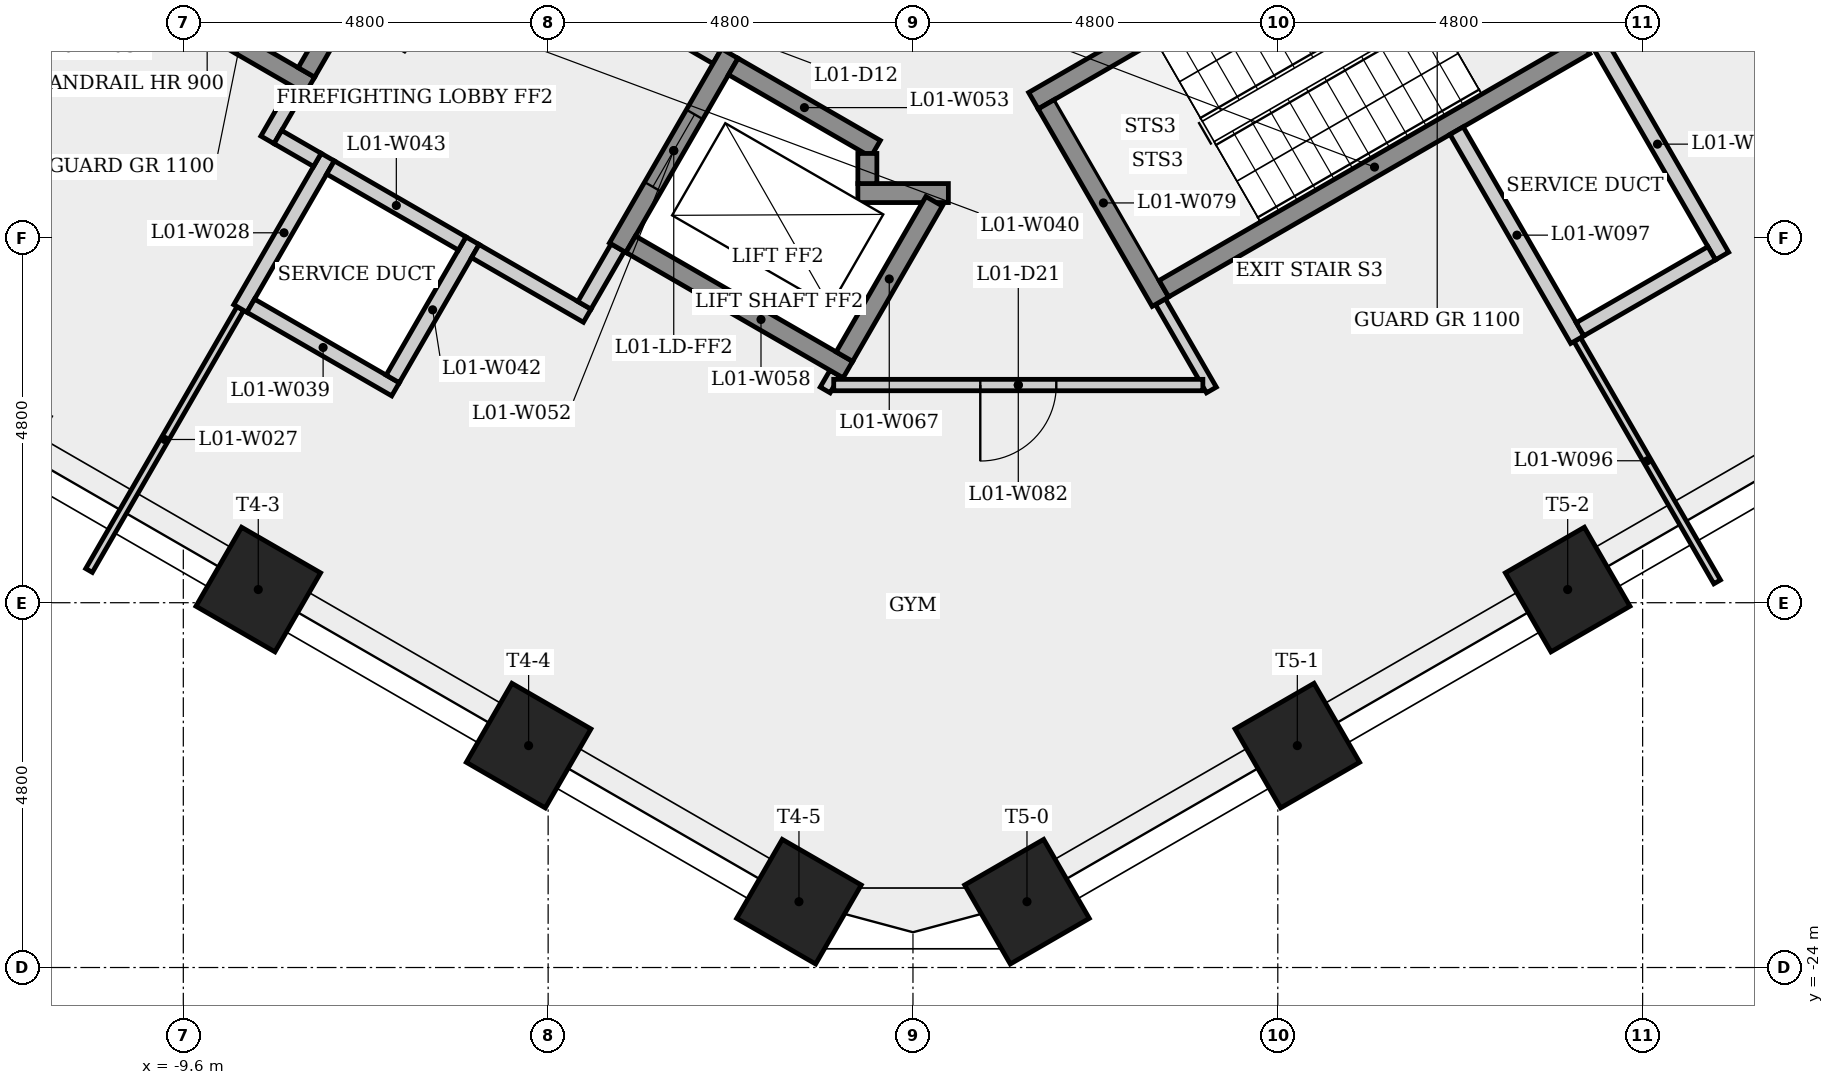
"""IFC4 building model, lengths in metres.
Left out: names, types, materials, properties, quantities, classifications, styles, units other than length and angle.
Written with IfcOpenShell. Run it as: python <this file> out.ifc"""

import sys

from ifc_helpers import new_model, si_unit, direction, frame, frame_2d, origin, origin_2d, place, context, subcontext, project, spatial, rectangle, extrude, element, fill, save


model = new_model("IFC4")
c1 = context("Model", 3, precision=1e-05, world=origin(), true_north=direction((0.0, 1.0)))
c2 = subcontext(c1, "Body", "Model", "MODEL_VIEW")
j1 = project(units=[si_unit("LENGTHUNIT", "METRE"), si_unit("PLANEANGLEUNIT", "RADIAN")], contexts=[c1])
p1 = place(None, origin())
s1 = spatial("IfcSite", under=j1, at=p1, CompositionType="ELEMENT")
p2 = place(p1, origin())
s2 = spatial("IfcBuilding", under=s1, at=p2, CompositionType="ELEMENT")
p3 = place(p2, frame((0.0, 0.0, 7.0)))
s3 = spatial("IfcBuildingStorey", under=s2, at=p3, CompositionType="ELEMENT", Elevation=7.0)
for number, where, z_axis, x_axis in (
    (1, (-8.614, -19.027, 0.0), (0.0, 0.0, 1.0), (-0.5, -0.866, 0.0)),
    (2, (-5.057, -21.08, 0.0), (0.0, 0.0, 1.0), (-0.5, -0.866, 0.0)),
    (3, (-1.5, -23.134, 0.0), (0.0, 0.0, 1.0), (-0.5, -0.866, 0.0)),
    (4, (1.5, -23.134, 0.0), (0.0, 0.0, 1.0), (0.5, -0.866, 0.0)),
    (5, (5.057, -21.08, 0.0), (0.0, 0.0, 1.0), (0.5, -0.866, 0.0)),
    (6, (8.614, -19.027, 0.0), (0.0, 0.0, 1.0), (0.5, -0.866, 0.0)),
):
    element("IfcColumn", number, at=place(p3, frame(where, z_axis=z_axis, x_axis=x_axis)), inside=s3, PredefinedType="COLUMN", context=c2, shape_type="SweptSolid", body=[
        extrude(rectangle(XDim=1.2, YDim=1.2, at=origin_2d()), origin(), (0.0, 0.0, 1.0), 4.5),
    ])
p4 = place(p3, frame((-10.84, -18.776, 0.0), z_axis=(0.0, 0.0, 1.0), x_axis=(0.499991453095, 0.866030338286, 0.0)))
e7 = element("IfcWall", 7, at=p4, inside=s3, PredefinedType="PARTITIONING", context=c2, shape_type="SweptSolid", body=[
    extrude(rectangle(XDim=3.98, YDim=0.1, at=frame_2d((1.99, 0.0))), origin(), (0.0, 0.0, 1.0), 4.1),
])
p5 = place(p3, frame((-8.85, -15.329, 0.0), z_axis=(0.0, 0.0, 1.0), x_axis=(0.500077740698, 0.865980515519, 0.0)))
e8 = element("IfcWall", 8, at=p5, inside=s3, PredefinedType="PLUMBINGWALL", context=c2, shape_type="SweptSolid", body=[
    extrude(rectangle(XDim=2.3, YDim=0.2, at=frame_2d((1.15, 0.0))), origin(), (0.0, 0.0, 1.0), 4.1),
])
p6 = place(p3, frame((-8.493, -13.11, 0.0), z_axis=(0.0, 0.0, 1.0), x_axis=(0.500067724834, 0.865986299303, 0.0)))
e9 = element("IfcWall", 9, at=p6, inside=s3, PredefinedType="PARTITIONING", context=c2, shape_type="SweptSolid", body=[
    extrude(rectangle(XDim=0.775, YDim=0.2, at=frame_2d((0.388, 0.0))), origin(), (0.0, 0.0, 1.0), 4.1),
])
p7 = place(p3, frame((-7.935, -12.393, 0.0), z_axis=(0.0, 0.0, 1.0), x_axis=(-0.866025499775, 0.499999833739, 0.0)))
e10 = element("IfcWall", 10, at=p7, inside=s3, PredefinedType="SHEAR", context=c2, shape_type="SweptSolid", body=[
    extrude(rectangle(XDim=6.4, YDim=0.25, at=frame_2d((3.2, 0.0))), origin(), (0.0, 0.0, 1.0), 4.1),
])
p8 = place(p3, frame((-7.836, -13.373, 0.0), z_axis=(0.0, 0.0, 1.0), x_axis=(-0.866232998003, 0.499640263761, 0.0)))
e11 = element("IfcWall", 11, at=p8, inside=s3, PredefinedType="PARTITIONING", context=c2, shape_type="SweptSolid", body=[
    extrude(rectangle(XDim=0.6, YDim=0.2, at=frame_2d((0.3, 0.0))), origin(), (0.0, 0.0, 1.0), 4.1),
])
p9 = place(p3, frame((-6.808, -16.392, 0.0), z_axis=(0.0, 0.0, 1.0), x_axis=(-0.866008176907, 0.50002983664, 0.0)))
e12 = element("IfcWall", 12, at=p9, inside=s3, PredefinedType="PLUMBINGWALL", context=c2, shape_type="SweptSolid", body=[
    extrude(rectangle(XDim=2.2, YDim=0.2, at=frame_2d((1.1, 0.0))), origin(), (0.0, 0.0, 1.0), 4.1),
])
p10 = place(p3, frame((-6.605, -9.841, 0.0), z_axis=(0.0, 0.0, 1.0), x_axis=(-0.499996545922, -0.866027397988, 0.0)))
e13 = element("IfcWall", 13, at=p10, inside=s3, PredefinedType="SHEAR", context=c2, shape_type="SweptSolid", body=[
    extrude(rectangle(XDim=2.75, YDim=0.25, at=frame_2d((1.375, 0.0))), origin(), (0.0, 0.0, 1.0), 4.1),
])
p11 = place(p10, frame((0.875, 0.0, 0.0)))
e14 = element("IfcOpeningElement", 14, at=p11, cuts=e13, PredefinedType="OPENING", context=c2, shape_type="SweptSolid", body=[
    extrude(rectangle(XDim=1.0, YDim=2.1, at=frame_2d((0.5, 1.05))), frame((0.0, 0.135, 0.0), z_axis=(0.0, -1.0, 0.0), x_axis=(1.0, 0.0, 0.0)), (0.0, 0.0, 1.0), 0.27),
])
p12 = place(p3, frame((-6.435, -9.795, 0.0), z_axis=(0.0, 0.0, 1.0), x_axis=(0.866012907634, -0.500021643343, 0.0)))
e15 = element("IfcWall", 15, at=p12, inside=s3, PredefinedType="PARTITIONING", context=c2, shape_type="SweptSolid", body=[
    extrude(rectangle(XDim=4.45, YDim=0.2, at=frame_2d((2.225, 0.0))), origin(), (0.0, 0.0, 1.0), 4.1),
])
p13 = place(p12, frame((1.675, 0.0, 0.0)))
e16 = element("IfcOpeningElement", 16, at=p13, cuts=e15, PredefinedType="OPENING", context=c2, shape_type="SweptSolid", body=[
    extrude(rectangle(XDim=1.1, YDim=2.1, at=frame_2d((0.55, 1.05))), frame((0.0, 0.11, 0.0), z_axis=(0.0, -1.0, 0.0), x_axis=(1.0, 0.0, 0.0)), (0.0, 0.0, 1.0), 0.22),
])
p14 = place(p3, frame((-5.795, -14.437, 0.0), z_axis=(0.0, 0.0, 1.0), x_axis=(-0.500027713859, -0.866009402589, 0.0)))
e17 = element("IfcWall", 17, at=p14, inside=s3, PredefinedType="PLUMBINGWALL", context=c2, shape_type="SweptSolid", body=[
    extrude(rectangle(XDim=2.1, YDim=0.2, at=frame_2d((1.05, 0.0))), origin(), (0.0, 0.0, 1.0), 4.1),
])
p15 = place(p3, frame((-5.931, -14.473, 0.0), z_axis=(0.0, 0.0, 1.0), x_axis=(-0.866041268327, 0.499972520799, 0.0)))
e18 = element("IfcWall", 18, at=p15, inside=s3, PredefinedType="PLUMBINGWALL", context=c2, shape_type="SweptSolid", body=[
    extrude(rectangle(XDim=2.0, YDim=0.2, at=frame_2d((1.0, 0.0))), origin(), (0.0, 0.0, 1.0), 4.1),
])
p16 = place(p3, frame((-4.286, -15.423, 0.0), z_axis=(0.0, 0.0, 1.0), x_axis=(-0.866025371046, 0.500000056704, 0.0)))
e19 = element("IfcWall", 19, at=p16, inside=s3, PredefinedType="PARTITIONING", context=c2, shape_type="SweptSolid", body=[
    extrude(rectangle(XDim=1.7, YDim=0.2, at=frame_2d((0.85, 0.0))), origin(), (0.0, 0.0, 1.0), 4.1),
])
p17 = place(p3, frame((-3.885, -14.529, 0.0), z_axis=(0.0, 0.0, 1.0), x_axis=(-0.499859285417, -0.866106630146, 0.0)))
e20 = element("IfcWall", 20, at=p17, inside=s3, PredefinedType="PARTITIONING", context=c2, shape_type="SweptSolid", body=[
    extrude(rectangle(XDim=0.875, YDim=0.2, at=frame_2d((0.438, 0.0))), origin(), (0.0, 0.0, 1.0), 4.1),
])
p18 = place(p3, frame((-2.41, -11.974, 0.0), z_axis=(0.0, 0.0, 1.0), x_axis=(-0.500001826776, -0.866024349092, 0.0)))
e21 = element("IfcWall", 21, at=p18, inside=s3, PredefinedType="SHEAR", context=c2, shape_type="SweptSolid", body=[
    extrude(rectangle(XDim=2.95, YDim=0.25, at=frame_2d((1.475, 0.0))), origin(), (0.0, 0.0, 1.0), 4.1),
])
p19 = place(p18, frame((0.925, 0.0, 0.0)))
e22 = element("IfcOpeningElement", 22, at=p19, cuts=e21, PredefinedType="OPENING", context=c2, shape_type="SweptSolid", body=[
    extrude(rectangle(XDim=1.1, YDim=2.1, at=frame_2d((0.55, 1.05))), frame((0.0, 0.135, 0.0), z_axis=(0.0, -1.0, 0.0), x_axis=(1.0, 0.0, 0.0)), (0.0, 0.0, 1.0), 0.27),
])
p20 = place(p3, frame((-2.364, -12.145, 0.0), z_axis=(0.0, 0.0, 1.0), x_axis=(0.86603892542, -0.499976579108, 0.0)))
e23 = element("IfcWall", 23, at=p20, inside=s3, PredefinedType="SHEAR", context=c2, shape_type="SweptSolid", body=[
    extrude(rectangle(XDim=2.162, YDim=0.25, at=frame_2d((1.081, 0.0))), origin(), (0.0, 0.0, 1.0), 4.1),
])
p21 = place(p3, frame((-1.155, -16.401, 0.0), z_axis=(0.0, 0.0, 1.0), x_axis=(0.500134748329, 0.865947592822, 0.0)))
e24 = element("IfcWall", 24, at=p21, inside=s3, PredefinedType="PARTITIONING", context=c2, shape_type="SweptSolid", body=[
    extrude(rectangle(XDim=0.256, YDim=0.15, at=frame_2d((0.128, 0.0))), origin(), (0.0, 0.0, 1.0), 4.1),
])
p22 = place(p3, frame((-0.856, -16.133, 0.0), z_axis=(0.0, 0.0, 1.0), x_axis=(-0.866021716278, 0.500006386895, 0.0)))
e25 = element("IfcWall", 25, at=p22, inside=s3, PredefinedType="SHEAR", context=c2, shape_type="SweptSolid", body=[
    extrude(rectangle(XDim=3.3, YDim=0.25, at=frame_2d((1.65, 0.0))), origin(), (0.0, 0.0, 1.0), 4.1),
])
p23 = place(p3, frame((-0.725, -13.81, 0.0), z_axis=(0.0, 0.0, 1.0), x_axis=(1.0, 0.0, 0.0)))
e26 = element("IfcWall", 26, at=p23, inside=s3, PredefinedType="SHEAR", context=c2, shape_type="SweptSolid", body=[
    extrude(rectangle(XDim=1.191, YDim=0.25, at=frame_2d((0.595, 0.0))), origin(), (0.0, 0.0, 1.0), 4.1),
])
p24 = place(p3, frame((-0.6, -13.289, 0.0), z_axis=(0.0, 0.0, 1.0), x_axis=(0.0, -1.0, 0.0)))
e27 = element("IfcWall", 27, at=p24, inside=s3, PredefinedType="SHEAR", context=c2, shape_type="SweptSolid", body=[
    extrude(rectangle(XDim=0.396, YDim=0.25, at=frame_2d((0.198, 0.0))), origin(), (0.0, 0.0, 1.0), 4.5),
])
p25 = place(p3, frame((0.278, -13.918, 0.0), z_axis=(0.0, 0.0, 1.0), x_axis=(-0.49998806882, -0.866032292145, 0.0)))
e28 = element("IfcWall", 28, at=p25, inside=s3, PredefinedType="SHEAR", context=c2, shape_type="SweptSolid", body=[
    extrude(rectangle(XDim=2.36, YDim=0.25, at=frame_2d((1.18, 0.0))), origin(), (0.0, 0.0, 1.0), 4.5),
])
p26 = place(p3, frame((1.585, -12.595, 0.0), z_axis=(0.0, 0.0, 1.0), x_axis=(0.866036417653, 0.499980922934, 0.0)))
e29 = element("IfcWall", 29, at=p26, inside=s3, PredefinedType="SHEAR", context=c2, shape_type="SweptSolid", body=[
    extrude(rectangle(XDim=6.65, YDim=0.25, at=frame_2d((3.325, 0.0))), origin(), (0.0, 0.0, 1.0), 4.1),
])
p27 = place(p26, frame((5.275, 0.0, 0.0)))
e30 = element("IfcOpeningElement", 30, at=p27, cuts=e29, PredefinedType="OPENING", context=c2, shape_type="SweptSolid", body=[
    extrude(rectangle(XDim=1.0, YDim=2.1, at=frame_2d((0.5, 1.05))), frame((0.0, 0.135, 0.0), z_axis=(0.0, -1.0, 0.0), x_axis=(1.0, 0.0, 0.0)), (0.0, 0.0, 1.0), 0.27),
])
p28 = place(p3, frame((3.256, -15.239, 0.0), z_axis=(0.0, 0.0, 1.0), x_axis=(0.499974444137, -0.866040157966, 0.0)))
e31 = element("IfcWall", 31, at=p28, inside=s3, PredefinedType="PARTITIONING", context=c2, shape_type="SweptSolid", body=[
    extrude(rectangle(XDim=1.342, YDim=0.15, at=frame_2d((0.671, 0.0))), origin(), (0.0, 0.0, 1.0), 4.1),
])
p29 = place(p3, frame((3.256, -15.239, 0.0), z_axis=(0.0, 0.0, 1.0), x_axis=(-0.50002537861, 0.866010750942, 0.0)))
e32 = element("IfcWall", 32, at=p29, inside=s3, PredefinedType="SHEAR", context=c2, shape_type="SweptSolid", body=[
    extrude(rectangle(XDim=3.0, YDim=0.25, at=frame_2d((1.5, 0.0))), origin(), (0.0, 0.0, 1.0), 4.1),
])
p30 = place(p3, frame((3.814, -16.336, 0.0), z_axis=(0.0, 0.0, 1.0), x_axis=(-1.0, 0.0, 0.0)))
e33 = element("IfcWall", 33, at=p30, inside=s3, PredefinedType="PARTITIONING", context=c2, shape_type="SweptSolid", body=[
    extrude(rectangle(XDim=4.857, YDim=0.15, at=frame_2d((2.428, 0.0))), origin(), (0.0, 0.0, 1.0), 4.1),
])
p31 = place(p30, frame((1.928, 0.0, 0.0)))
e34 = element("IfcOpeningElement", 34, at=p31, cuts=e33, PredefinedType="OPENING", context=c2, shape_type="SweptSolid", body=[
    extrude(rectangle(XDim=1.0, YDim=2.1, at=frame_2d((0.5, 1.05))), frame((0.0, 0.085, 0.0), z_axis=(0.0, -1.0, 0.0), x_axis=(1.0, 0.0, 0.0)), (0.0, 0.0, 1.0), 0.17),
])
p32 = place(p3, frame((3.301, -15.068, 0.0), z_axis=(0.0, 0.0, 1.0), x_axis=(0.866035036182, 0.499983315828, 0.0)))
e35 = element("IfcWall", 35, at=p32, inside=s3, PredefinedType="SHEAR", context=c2, shape_type="SweptSolid", body=[
    extrude(rectangle(XDim=6.4, YDim=0.25, at=frame_2d((3.2, 0.0))), origin(), (0.0, 0.0, 1.0), 4.1),
])
p33 = place(p3, frame((8.74, -15.738, 0.0), z_axis=(0.0, 0.0, 1.0), x_axis=(0.500026738915, -0.866009965514, 0.0)))
e36 = element("IfcWall", 36, at=p33, inside=s3, PredefinedType="PARTITIONING", context=c2, shape_type="SweptSolid", body=[
    extrude(rectangle(XDim=3.681, YDim=0.1, at=frame_2d((1.84, 0.0))), origin(), (0.0, 0.0, 1.0), 4.1),
])
p34 = place(p3, frame((8.74, -15.739, 0.0), z_axis=(0.0, 0.0, 1.0), x_axis=(-0.500017526161, 0.866015284814, 0.0)))
e37 = element("IfcWall", 37, at=p34, inside=s3, PredefinedType="PLUMBINGWALL", context=c2, shape_type="SweptSolid", body=[
    extrude(rectangle(XDim=3.175, YDim=0.2, at=frame_2d((1.588, 0.0))), origin(), (0.0, 0.0, 1.0), 4.1),
])
p35 = place(p3, frame((8.945, -11.694, 0.0), z_axis=(0.0, 0.0, 1.0), x_axis=(0.500062241894, -0.865989465428, 0.0)))
e38 = element("IfcWall", 38, at=p35, inside=s3, PredefinedType="PLUMBINGWALL", context=c2, shape_type="SweptSolid", body=[
    extrude(rectangle(XDim=3.4, YDim=0.2, at=frame_2d((1.7, 0.0))), origin(), (0.0, 0.0, 1.0), 4.1),
])
p36 = place(p3, frame((10.509, -14.602, 0.0), z_axis=(0.0, 0.0, 1.0), x_axis=(-0.866010750942, -0.50002537861, 0.0)))
e39 = element("IfcWall", 39, at=p36, inside=s3, PredefinedType="PLUMBINGWALL", context=c2, shape_type="SweptSolid", body=[
    extrude(rectangle(XDim=2.0, YDim=0.2, at=frame_2d((1.0, 0.0))), origin(), (0.0, 0.0, 1.0), 4.1),
])
p37 = place(p3, frame((12.587, -13.401, 0.0), z_axis=(0.0, 0.0, 1.0), x_axis=(-0.499952049853, 0.866053086045, 0.0)))
e40 = element("IfcWall", 40, at=p37, inside=s3, PredefinedType="PARTITIONING", context=c2, shape_type="SweptSolid", body=[
    extrude(rectangle(XDim=3.099, YDim=0.15, at=frame_2d((1.549, 0.0))), origin(), (0.0, 0.0, 1.0), 4.1),
])
p38 = place(p19, origin())
e41 = element("IfcDoor", 41, at=p38, inside=s3, OperationType="SLIDING_TO_LEFT", PredefinedType="DOOR", context=c2, shape_type="SweptSolid", body=[
    extrude(rectangle(XDim=1.1, YDim=2.1, at=frame_2d((0.55, 1.05))), frame((0.0, 0.025, 0.0), z_axis=(0.0, -1.0, 0.0), x_axis=(1.0, 0.0, 0.0)), (0.0, 0.0, 1.0), 0.05),
])
fill(e22, e41)
p39 = place(p31, origin())
e42 = element("IfcDoor", 42, at=p39, inside=s3, OperationType="SINGLE_SWING_RIGHT", PredefinedType="DOOR", context=c2, shape_type="SweptSolid", body=[
    extrude(rectangle(XDim=1.0, YDim=2.1, at=frame_2d((0.5, 1.05))), frame((0.0, 0.025, 0.0), z_axis=(0.0, -1.0, 0.0), x_axis=(1.0, 0.0, 0.0)), (0.0, 0.0, 1.0), 0.05),
])
fill(e34, e42)
save(model, sys.argv[1])
